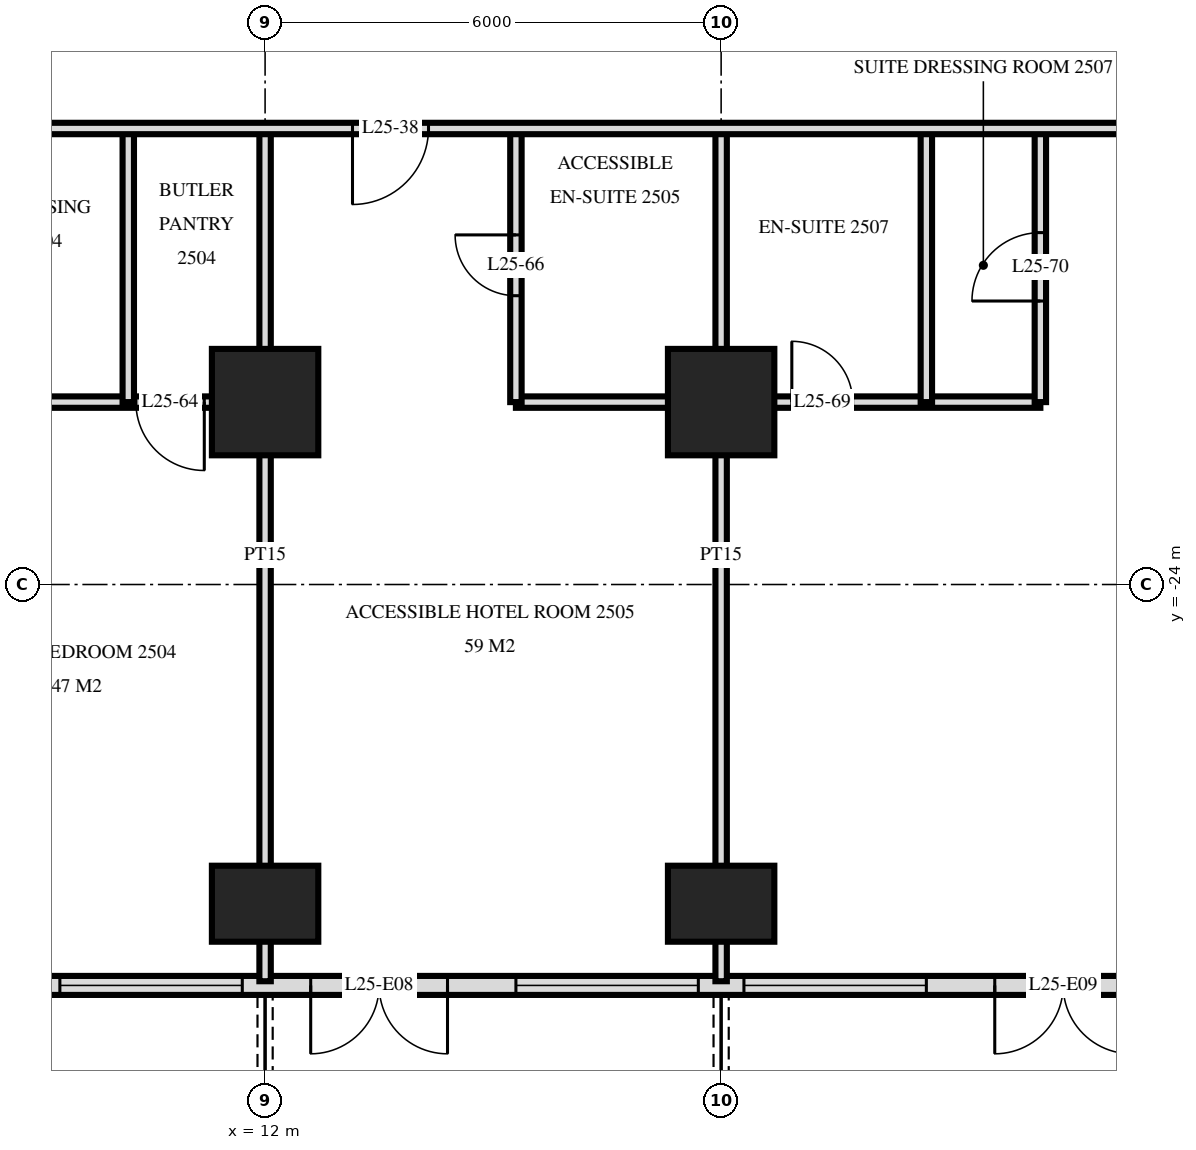
"""IFC4 building model, lengths in metres.
Left out: names, types, materials, properties, quantities, classifications, styles, units other than length and angle.
Written with IfcOpenShell. Run it as: python <this file> out.ifc"""

import sys

from ifc_helpers import new_model, si_unit, direction, frame, frame_2d, origin, origin_2d, place, context, subcontext, project, spatial, rectangle, extrude, element, fill, save


model = new_model("IFC4")
c1 = context("Model", 3, precision=1e-05, world=origin(), true_north=direction((0.0, 1.0)))
c2 = subcontext(c1, "Body", "Model", "MODEL_VIEW")
j1 = project(units=[si_unit("LENGTHUNIT", "METRE"), si_unit("PLANEANGLEUNIT", "RADIAN")], contexts=[c1])
p1 = place(None, origin())
s1 = spatial("IfcSite", under=j1, at=p1, CompositionType="ELEMENT")
p2 = place(p1, origin())
s2 = spatial("IfcBuilding", under=s1, at=p2, CompositionType="ELEMENT")
p3 = place(p2, frame((0.0, 0.0, 99.6)))
s3 = spatial("IfcBuildingStorey", under=s2, at=p3, CompositionType="ELEMENT", Elevation=99.6)
p4 = place(p3, frame((12.0, -28.2, 0.0), z_axis=(0.0, 0.0, 1.0), x_axis=(1.0, 0.0, 0.0)))
e1 = element("IfcColumn", 1, at=p4, inside=s3, PredefinedType="COLUMN", context=c2, shape_type="SweptSolid", body=[
    extrude(rectangle(XDim=1.4, YDim=1.0, at=origin_2d()), origin(), (0.0, 0.0, 1.0), 3.6),
])
p5 = place(p3, frame((12.0, -21.6, 0.0), z_axis=(0.0, 0.0, 1.0), x_axis=(1.0, 0.0, 0.0)))
e2 = element("IfcColumn", 2, at=p5, inside=s3, PredefinedType="COLUMN", context=c2, shape_type="SweptSolid", body=[
    extrude(rectangle(XDim=1.4, YDim=1.4, at=origin_2d()), origin(), (0.0, 0.0, 1.0), 3.6),
])
p6 = place(p3, frame((18.0, -28.2, 0.0), z_axis=(0.0, 0.0, 1.0), x_axis=(1.0, 0.0, 0.0)))
e3 = element("IfcColumn", 3, at=p6, inside=s3, PredefinedType="COLUMN", context=c2, shape_type="SweptSolid", body=[
    extrude(rectangle(XDim=1.4, YDim=1.0, at=origin_2d()), origin(), (0.0, 0.0, 1.0), 3.6),
])
p7 = place(p3, frame((18.0, -21.6, 0.0), z_axis=(0.0, 0.0, 1.0), x_axis=(1.0, 0.0, 0.0)))
e4 = element("IfcColumn", 4, at=p7, inside=s3, PredefinedType="COLUMN", context=c2, shape_type="SweptSolid", body=[
    extrude(rectangle(XDim=1.4, YDim=1.4, at=origin_2d()), origin(), (0.0, 0.0, 1.0), 3.6),
])
p8 = place(p3, frame((-28.775, -29.275, 0.0), z_axis=(0.0, 0.0, 1.0), x_axis=(1.0, 0.0, 0.0)))
e5 = element("IfcWall", 5, at=p8, inside=s3, PredefinedType="SOLIDWALL", context=c2, shape_type="SweptSolid", body=[
    extrude(rectangle(XDim=57.551, YDim=0.25, at=frame_2d((28.775, 0.0))), origin(), (0.0, 0.0, 1.0), 3.32),
])
p9 = place(p8, frame((0.575, 0.0, 0.0)))
e6 = element("IfcOpeningElement", 6, at=p9, cuts=e5, PredefinedType="OPENING", context=c2, shape_type="SweptSolid", body=[
    extrude(rectangle(XDim=1.8, YDim=2.4, at=frame_2d((0.9, 1.2))), frame((0.0, 0.135, 0.0), z_axis=(0.0, -1.0, 0.0), x_axis=(1.0, 0.0, 0.0)), (0.0, 0.0, 1.0), 0.27),
])
p10 = place(p8, frame((5.375, 0.0, 0.0)))
e7 = element("IfcOpeningElement", 7, at=p10, cuts=e5, PredefinedType="OPENING", context=c2, shape_type="SweptSolid", body=[
    extrude(rectangle(XDim=1.8, YDim=2.4, at=frame_2d((0.9, 1.2))), frame((0.0, 0.135, 0.0), z_axis=(0.0, -1.0, 0.0), x_axis=(1.0, 0.0, 0.0)), (0.0, 0.0, 1.0), 0.27),
])
p11 = place(p8, frame((8.075, 0.0, 0.3)))
e8 = element("IfcOpeningElement", 8, at=p11, cuts=e5, PredefinedType="OPENING", context=c2, shape_type="SweptSolid", body=[
    extrude(rectangle(XDim=2.4, YDim=2.1, at=frame_2d((1.2, 1.05))), frame((0.0, 0.135, 0.0), z_axis=(0.0, -1.0, 0.0), x_axis=(1.0, 0.0, 0.0)), (0.0, 0.0, 1.0), 0.27),
])
p12 = place(p8, frame((11.375, 0.0, 0.0)))
e9 = element("IfcOpeningElement", 9, at=p12, cuts=e5, PredefinedType="OPENING", context=c2, shape_type="SweptSolid", body=[
    extrude(rectangle(XDim=1.8, YDim=2.4, at=frame_2d((0.9, 1.2))), frame((0.0, 0.135, 0.0), z_axis=(0.0, -1.0, 0.0), x_axis=(1.0, 0.0, 0.0)), (0.0, 0.0, 1.0), 0.27),
])
p13 = place(p8, frame((14.075, 0.0, 0.3)))
e10 = element("IfcOpeningElement", 10, at=p13, cuts=e5, PredefinedType="OPENING", context=c2, shape_type="SweptSolid", body=[
    extrude(rectangle(XDim=2.4, YDim=2.1, at=frame_2d((1.2, 1.05))), frame((0.0, 0.135, 0.0), z_axis=(0.0, -1.0, 0.0), x_axis=(1.0, 0.0, 0.0)), (0.0, 0.0, 1.0), 0.27),
])
p14 = place(p8, frame((17.375, 0.0, 0.0)))
e11 = element("IfcOpeningElement", 11, at=p14, cuts=e5, PredefinedType="OPENING", context=c2, shape_type="SweptSolid", body=[
    extrude(rectangle(XDim=1.8, YDim=2.4, at=frame_2d((0.9, 1.2))), frame((0.0, 0.135, 0.0), z_axis=(0.0, -1.0, 0.0), x_axis=(1.0, 0.0, 0.0)), (0.0, 0.0, 1.0), 0.27),
])
p15 = place(p8, frame((20.075, 0.0, 0.3)))
e12 = element("IfcOpeningElement", 12, at=p15, cuts=e5, PredefinedType="OPENING", context=c2, shape_type="SweptSolid", body=[
    extrude(rectangle(XDim=2.4, YDim=2.1, at=frame_2d((1.2, 1.05))), frame((0.0, 0.135, 0.0), z_axis=(0.0, -1.0, 0.0), x_axis=(1.0, 0.0, 0.0)), (0.0, 0.0, 1.0), 0.27),
])
p16 = place(p8, frame((23.075, 0.0, 0.3)))
e13 = element("IfcOpeningElement", 13, at=p16, cuts=e5, PredefinedType="OPENING", context=c2, shape_type="SweptSolid", body=[
    extrude(rectangle(XDim=2.4, YDim=2.1, at=frame_2d((1.2, 1.05))), frame((0.0, 0.135, 0.0), z_axis=(0.0, -1.0, 0.0), x_axis=(1.0, 0.0, 0.0)), (0.0, 0.0, 1.0), 0.27),
])
p17 = place(p8, frame((26.375, 0.0, 0.0)))
e14 = element("IfcOpeningElement", 14, at=p17, cuts=e5, PredefinedType="OPENING", context=c2, shape_type="SweptSolid", body=[
    extrude(rectangle(XDim=1.8, YDim=2.4, at=frame_2d((0.9, 1.2))), frame((0.0, 0.135, 0.0), z_axis=(0.0, -1.0, 0.0), x_axis=(1.0, 0.0, 0.0)), (0.0, 0.0, 1.0), 0.27),
])
p18 = place(p8, frame((29.075, 0.0, 0.3)))
e15 = element("IfcOpeningElement", 15, at=p18, cuts=e5, PredefinedType="OPENING", context=c2, shape_type="SweptSolid", body=[
    extrude(rectangle(XDim=2.4, YDim=2.1, at=frame_2d((1.2, 1.05))), frame((0.0, 0.135, 0.0), z_axis=(0.0, -1.0, 0.0), x_axis=(1.0, 0.0, 0.0)), (0.0, 0.0, 1.0), 0.27),
])
p19 = place(p8, frame((32.375, 0.0, 0.0)))
e16 = element("IfcOpeningElement", 16, at=p19, cuts=e5, PredefinedType="OPENING", context=c2, shape_type="SweptSolid", body=[
    extrude(rectangle(XDim=1.8, YDim=2.4, at=frame_2d((0.9, 1.2))), frame((0.0, 0.135, 0.0), z_axis=(0.0, -1.0, 0.0), x_axis=(1.0, 0.0, 0.0)), (0.0, 0.0, 1.0), 0.27),
])
p20 = place(p8, frame((35.375, 0.0, 0.0)))
e17 = element("IfcOpeningElement", 17, at=p20, cuts=e5, PredefinedType="OPENING", context=c2, shape_type="SweptSolid", body=[
    extrude(rectangle(XDim=1.8, YDim=2.4, at=frame_2d((0.9, 1.2))), frame((0.0, 0.135, 0.0), z_axis=(0.0, -1.0, 0.0), x_axis=(1.0, 0.0, 0.0)), (0.0, 0.0, 1.0), 0.27),
])
p21 = place(p8, frame((38.075, 0.0, 0.3)))
e18 = element("IfcOpeningElement", 18, at=p21, cuts=e5, PredefinedType="OPENING", context=c2, shape_type="SweptSolid", body=[
    extrude(rectangle(XDim=2.4, YDim=2.1, at=frame_2d((1.2, 1.05))), frame((0.0, 0.135, 0.0), z_axis=(0.0, -1.0, 0.0), x_axis=(1.0, 0.0, 0.0)), (0.0, 0.0, 1.0), 0.27),
])
p22 = place(p8, frame((41.375, 0.0, 0.0)))
e19 = element("IfcOpeningElement", 19, at=p22, cuts=e5, PredefinedType="OPENING", context=c2, shape_type="SweptSolid", body=[
    extrude(rectangle(XDim=1.8, YDim=2.4, at=frame_2d((0.9, 1.2))), frame((0.0, 0.135, 0.0), z_axis=(0.0, -1.0, 0.0), x_axis=(1.0, 0.0, 0.0)), (0.0, 0.0, 1.0), 0.27),
])
p23 = place(p8, frame((44.075, 0.0, 0.3)))
e20 = element("IfcOpeningElement", 20, at=p23, cuts=e5, PredefinedType="OPENING", context=c2, shape_type="SweptSolid", body=[
    extrude(rectangle(XDim=2.4, YDim=2.1, at=frame_2d((1.2, 1.05))), frame((0.0, 0.135, 0.0), z_axis=(0.0, -1.0, 0.0), x_axis=(1.0, 0.0, 0.0)), (0.0, 0.0, 1.0), 0.27),
])
p24 = place(p8, frame((47.075, 0.0, 0.3)))
e21 = element("IfcOpeningElement", 21, at=p24, cuts=e5, PredefinedType="OPENING", context=c2, shape_type="SweptSolid", body=[
    extrude(rectangle(XDim=2.4, YDim=2.1, at=frame_2d((1.2, 1.05))), frame((0.0, 0.135, 0.0), z_axis=(0.0, -1.0, 0.0), x_axis=(1.0, 0.0, 0.0)), (0.0, 0.0, 1.0), 0.27),
])
p25 = place(p8, frame((50.375, 0.0, 0.0)))
e22 = element("IfcOpeningElement", 22, at=p25, cuts=e5, PredefinedType="OPENING", context=c2, shape_type="SweptSolid", body=[
    extrude(rectangle(XDim=1.8, YDim=2.4, at=frame_2d((0.9, 1.2))), frame((0.0, 0.135, 0.0), z_axis=(0.0, -1.0, 0.0), x_axis=(1.0, 0.0, 0.0)), (0.0, 0.0, 1.0), 0.27),
])
p26 = place(p8, frame((53.375, 0.0, 0.0)))
e23 = element("IfcOpeningElement", 23, at=p26, cuts=e5, PredefinedType="OPENING", context=c2, shape_type="SweptSolid", body=[
    extrude(rectangle(XDim=1.8, YDim=2.4, at=frame_2d((0.9, 1.2))), frame((0.0, 0.135, 0.0), z_axis=(0.0, -1.0, 0.0), x_axis=(1.0, 0.0, 0.0)), (0.0, 0.0, 1.0), 0.27),
])
p27 = place(p3, frame((22.2, -21.6, 0.0), z_axis=(0.0, 0.0, 1.0), x_axis=(0.0, 1.0, 0.0)))
e24 = element("IfcWall", 24, at=p27, inside=s3, PredefinedType="PARTITIONING", context=c2, shape_type="SweptSolid", body=[
    extrude(rectangle(XDim=3.6, YDim=0.15, at=frame_2d((1.8, 0.0))), origin(), (0.0, 0.0, 1.0), 3.32),
])
p28 = place(p27, frame((1.33, 0.0, 0.0)))
e25 = element("IfcOpeningElement", 25, at=p28, cuts=e24, PredefinedType="OPENING", context=c2, shape_type="SweptSolid", body=[
    extrude(rectangle(XDim=0.9, YDim=2.1, at=frame_2d((0.45, 1.05))), frame((0.0, 0.085, 0.0), z_axis=(0.0, -1.0, 0.0), x_axis=(1.0, 0.0, 0.0)), (0.0, 0.0, 1.0), 0.17),
])
p29 = place(p3, frame((20.7, -21.6, 0.0), z_axis=(0.0, 0.0, 1.0), x_axis=(0.0, 1.0, 0.0)))
e26 = element("IfcWall", 26, at=p29, inside=s3, PredefinedType="PARTITIONING", context=c2, shape_type="SweptSolid", body=[
    extrude(rectangle(XDim=3.6, YDim=0.15, at=frame_2d((1.8, 0.0))), origin(), (0.0, 0.0, 1.0), 3.32),
])
p30 = place(p3, frame((18.0, -29.22, 0.0), z_axis=(0.0, 0.0, 1.0), x_axis=(0.0, 1.0, 0.0)))
e27 = element("IfcWall", 27, at=p30, inside=s3, PredefinedType="PARTITIONING", context=c2, shape_type="SweptSolid", body=[
    extrude(rectangle(XDim=11.22, YDim=0.15, at=frame_2d((5.61, 0.0))), origin(), (0.0, 0.0, 1.0), 3.32),
])
p31 = place(p3, frame((15.3, -21.6, 0.0), z_axis=(0.0, 0.0, 1.0), x_axis=(0.0, 1.0, 0.0)))
e28 = element("IfcWall", 28, at=p31, inside=s3, PredefinedType="PARTITIONING", context=c2, shape_type="SweptSolid", body=[
    extrude(rectangle(XDim=3.6, YDim=0.15, at=frame_2d((1.8, 0.0))), origin(), (0.0, 0.0, 1.0), 3.32),
])
p32 = place(p31, frame((1.4, 0.0, 0.0)))
e29 = element("IfcOpeningElement", 29, at=p32, cuts=e28, PredefinedType="OPENING", context=c2, shape_type="SweptSolid", body=[
    extrude(rectangle(XDim=0.8, YDim=2.1, at=frame_2d((0.4, 1.05))), frame((0.0, 0.085, 0.0), z_axis=(0.0, -1.0, 0.0), x_axis=(1.0, 0.0, 0.0)), (0.0, 0.0, 1.0), 0.17),
])
p33 = place(p3, frame((12.0, -29.22, 0.0), z_axis=(0.0, 0.0, 1.0), x_axis=(0.0, 1.0, 0.0)))
e30 = element("IfcWall", 30, at=p33, inside=s3, PredefinedType="PARTITIONING", context=c2, shape_type="SweptSolid", body=[
    extrude(rectangle(XDim=11.22, YDim=0.15, at=frame_2d((5.61, 0.0))), origin(), (0.0, 0.0, 1.0), 3.32),
])
p34 = place(p3, frame((10.2, -21.6, 0.0), z_axis=(0.0, 0.0, 1.0), x_axis=(0.0, 1.0, 0.0)))
e31 = element("IfcWall", 31, at=p34, inside=s3, PredefinedType="PARTITIONING", context=c2, shape_type="SweptSolid", body=[
    extrude(rectangle(XDim=3.6, YDim=0.15, at=frame_2d((1.8, 0.0))), origin(), (0.0, 0.0, 1.0), 3.32),
])
p35 = place(p3, frame((4.2, -21.6, 0.0), z_axis=(0.0, 0.0, 1.0), x_axis=(1.0, 0.0, 0.0)))
e32 = element("IfcWall", 32, at=p35, inside=s3, PredefinedType="PARTITIONING", context=c2, shape_type="SweptSolid", body=[
    extrude(rectangle(XDim=7.8, YDim=0.15, at=frame_2d((3.9, 0.0))), origin(), (0.0, 0.0, 1.0), 3.32),
])
p36 = place(p35, frame((0.2, 0.0, 0.0)))
e33 = element("IfcOpeningElement", 33, at=p36, cuts=e32, PredefinedType="OPENING", context=c2, shape_type="SweptSolid", body=[
    extrude(rectangle(XDim=0.8, YDim=2.1, at=frame_2d((0.4, 1.05))), frame((0.0, 0.085, 0.0), z_axis=(0.0, -1.0, 0.0), x_axis=(1.0, 0.0, 0.0)), (0.0, 0.0, 1.0), 0.17),
])
p37 = place(p35, frame((4.03, 0.0, 0.0)))
e34 = element("IfcOpeningElement", 34, at=p37, cuts=e32, PredefinedType="OPENING", context=c2, shape_type="SweptSolid", body=[
    extrude(rectangle(XDim=0.9, YDim=2.1, at=frame_2d((0.45, 1.05))), frame((0.0, 0.085, 0.0), z_axis=(0.0, -1.0, 0.0), x_axis=(1.0, 0.0, 0.0)), (0.0, 0.0, 1.0), 0.17),
])
p38 = place(p35, frame((6.1, 0.0, 0.0)))
e35 = element("IfcOpeningElement", 35, at=p38, cuts=e32, PredefinedType="OPENING", context=c2, shape_type="SweptSolid", body=[
    extrude(rectangle(XDim=0.9, YDim=2.1, at=frame_2d((0.45, 1.05))), frame((0.0, 0.085, 0.0), z_axis=(0.0, -1.0, 0.0), x_axis=(1.0, 0.0, 0.0)), (0.0, 0.0, 1.0), 0.17),
])
p39 = place(p3, frame((15.3, -21.6, 0.0), z_axis=(0.0, 0.0, 1.0), x_axis=(1.0, 0.0, 0.0)))
e36 = element("IfcWall", 36, at=p39, inside=s3, PredefinedType="PARTITIONING", context=c2, shape_type="SweptSolid", body=[
    extrude(rectangle(XDim=6.9, YDim=0.15, at=frame_2d((3.45, 0.0))), origin(), (0.0, 0.0, 1.0), 3.32),
])
p40 = place(p39, frame((3.63, 0.0, 0.0)))
e37 = element("IfcOpeningElement", 37, at=p40, cuts=e36, PredefinedType="OPENING", context=c2, shape_type="SweptSolid", body=[
    extrude(rectangle(XDim=0.8, YDim=2.1, at=frame_2d((0.4, 1.05))), frame((0.0, 0.085, 0.0), z_axis=(0.0, -1.0, 0.0), x_axis=(1.0, 0.0, 0.0)), (0.0, 0.0, 1.0), 0.17),
])
p41 = place(p3, frame((-33.12, -18.0, 0.0), z_axis=(0.0, 0.0, 1.0), x_axis=(1.0, 0.0, 0.0)))
e38 = element("IfcWall", 38, at=p41, inside=s3, PredefinedType="PARTITIONING", context=c2, shape_type="SweptSolid", body=[
    extrude(rectangle(XDim=66.24, YDim=0.15, at=frame_2d((33.12, 0.0))), origin(), (0.0, 0.0, 1.0), 3.32),
])
p42 = place(p41, frame((14.02, 0.0, 0.0)))
e39 = element("IfcOpeningElement", 39, at=p42, cuts=e38, PredefinedType="OPENING", context=c2, shape_type="SweptSolid", body=[
    extrude(rectangle(XDim=1.0, YDim=2.1, at=frame_2d((0.5, 1.05))), frame((0.0, 0.085, 0.0), z_axis=(0.0, -1.0, 0.0), x_axis=(1.0, 0.0, 0.0)), (0.0, 0.0, 1.0), 0.17),
])
p43 = place(p41, frame((18.82, 0.0, 0.0)))
e40 = element("IfcOpeningElement", 40, at=p43, cuts=e38, PredefinedType="OPENING", context=c2, shape_type="SweptSolid", body=[
    extrude(rectangle(XDim=1.0, YDim=2.1, at=frame_2d((0.5, 1.05))), frame((0.0, 0.085, 0.0), z_axis=(0.0, -1.0, 0.0), x_axis=(1.0, 0.0, 0.0)), (0.0, 0.0, 1.0), 0.17),
])
p44 = place(p41, frame((30.27, 0.0, 0.0)))
e41 = element("IfcOpeningElement", 41, at=p44, cuts=e38, PredefinedType="OPENING", context=c2, shape_type="SweptSolid", body=[
    extrude(rectangle(XDim=1.0, YDim=2.1, at=frame_2d((0.5, 1.05))), frame((0.0, 0.085, 0.0), z_axis=(0.0, -1.0, 0.0), x_axis=(1.0, 0.0, 0.0)), (0.0, 0.0, 1.0), 0.17),
])
p45 = place(p41, frame((33.82, 0.0, 0.0)))
e42 = element("IfcOpeningElement", 42, at=p45, cuts=e38, PredefinedType="OPENING", context=c2, shape_type="SweptSolid", body=[
    extrude(rectangle(XDim=1.0, YDim=2.1, at=frame_2d((0.5, 1.05))), frame((0.0, 0.085, 0.0), z_axis=(0.0, -1.0, 0.0), x_axis=(1.0, 0.0, 0.0)), (0.0, 0.0, 1.0), 0.17),
])
p46 = place(p41, frame((46.27, 0.0, 0.0)))
e43 = element("IfcOpeningElement", 43, at=p46, cuts=e38, PredefinedType="OPENING", context=c2, shape_type="SweptSolid", body=[
    extrude(rectangle(XDim=1.0, YDim=2.1, at=frame_2d((0.5, 1.05))), frame((0.0, 0.085, 0.0), z_axis=(0.0, -1.0, 0.0), x_axis=(1.0, 0.0, 0.0)), (0.0, 0.0, 1.0), 0.17),
])
p47 = place(p41, frame((6.07, 0.0, 0.0)))
e44 = element("IfcOpeningElement", 44, at=p47, cuts=e38, PredefinedType="OPENING", context=c2, shape_type="SweptSolid", body=[
    extrude(rectangle(XDim=1.0, YDim=2.1, at=frame_2d((0.5, 1.05))), frame((0.0, 0.085, 0.0), z_axis=(0.0, -1.0, 0.0), x_axis=(1.0, 0.0, 0.0)), (0.0, 0.0, 1.0), 0.17),
])
p48 = place(p41, frame((60.37, 0.0, 0.0)))
e45 = element("IfcOpeningElement", 45, at=p48, cuts=e38, PredefinedType="OPENING", context=c2, shape_type="SweptSolid", body=[
    extrude(rectangle(XDim=1.0, YDim=2.1, at=frame_2d((0.5, 1.05))), frame((0.0, 0.085, 0.0), z_axis=(0.0, -1.0, 0.0), x_axis=(1.0, 0.0, 0.0)), (0.0, 0.0, 1.0), 0.17),
])
p49 = place(p21, origin())
e46 = element("IfcWindow", 46, at=p49, inside=s3, PartitioningType="SINGLE_PANEL", PredefinedType="WINDOW", context=c2, shape_type="SweptSolid", body=[
    extrude(rectangle(XDim=2.4, YDim=2.1, at=frame_2d((1.2, 1.05))), frame((0.0, 0.03, 0.0), z_axis=(0.0, -1.0, 0.0), x_axis=(1.0, 0.0, 0.0)), (0.0, 0.0, 1.0), 0.06),
])
fill(e18, e46)
p50 = place(p22, frame((0.9, 0.0, 0.0), z_axis=(0.0, 0.0, 1.0), x_axis=(-1.0, 0.0, 0.0)))
e47 = element("IfcDoor", 47, at=p50, inside=s3, OperationType="DOUBLE_DOOR_SINGLE_SWING", PredefinedType="DOOR", context=c2, shape_type="SweptSolid", body=[
    extrude(rectangle(XDim=1.8, YDim=2.4, at=frame_2d((0.0, 1.2))), frame((0.0, -0.025, 0.0), z_axis=(0.0, 1.0, 0.0), x_axis=(-1.0, 0.0, 0.0)), (0.0, 0.0, 1.0), 0.05),
])
fill(e19, e47)
p51 = place(p23, origin())
e48 = element("IfcWindow", 48, at=p51, inside=s3, PartitioningType="SINGLE_PANEL", PredefinedType="WINDOW", context=c2, shape_type="SweptSolid", body=[
    extrude(rectangle(XDim=2.4, YDim=2.1, at=frame_2d((1.2, 1.05))), frame((0.0, 0.03, 0.0), z_axis=(0.0, -1.0, 0.0), x_axis=(1.0, 0.0, 0.0)), (0.0, 0.0, 1.0), 0.06),
])
fill(e20, e48)
p52 = place(p24, origin())
e49 = element("IfcWindow", 49, at=p52, inside=s3, PartitioningType="SINGLE_PANEL", PredefinedType="WINDOW", context=c2, shape_type="SweptSolid", body=[
    extrude(rectangle(XDim=2.4, YDim=2.1, at=frame_2d((1.2, 1.05))), frame((0.0, 0.03, 0.0), z_axis=(0.0, -1.0, 0.0), x_axis=(1.0, 0.0, 0.0)), (0.0, 0.0, 1.0), 0.06),
])
fill(e21, e49)
p53 = place(p25, frame((0.9, 0.0, 0.0), z_axis=(0.0, 0.0, 1.0), x_axis=(-1.0, 0.0, 0.0)))
e50 = element("IfcDoor", 50, at=p53, inside=s3, OperationType="DOUBLE_DOOR_SINGLE_SWING", PredefinedType="DOOR", context=c2, shape_type="SweptSolid", body=[
    extrude(rectangle(XDim=1.8, YDim=2.4, at=frame_2d((0.0, 1.2))), frame((0.0, -0.025, 0.0), z_axis=(0.0, 1.0, 0.0), x_axis=(-1.0, 0.0, 0.0)), (0.0, 0.0, 1.0), 0.05),
])
fill(e22, e50)
p54 = place(p46, frame((0.5, 0.0, 0.0), z_axis=(0.0, 0.0, 1.0), x_axis=(-1.0, 0.0, 0.0)))
e51 = element("IfcDoor", 51, at=p54, inside=s3, OperationType="SINGLE_SWING_LEFT", PredefinedType="DOOR", context=c2, shape_type="SweptSolid", body=[
    extrude(rectangle(XDim=1.0, YDim=2.1, at=frame_2d((0.0, 1.05))), frame((0.0, -0.025, 0.0), z_axis=(0.0, 1.0, 0.0), x_axis=(-1.0, 0.0, 0.0)), (0.0, 0.0, 1.0), 0.05),
])
fill(e43, e51)
p55 = place(p38, frame((0.45, 0.0, 0.0), z_axis=(0.0, 0.0, 1.0), x_axis=(-1.0, 0.0, 0.0)))
e52 = element("IfcDoor", 52, at=p55, inside=s3, OperationType="SINGLE_SWING_RIGHT", PredefinedType="DOOR", context=c2, shape_type="SweptSolid", body=[
    extrude(rectangle(XDim=0.9, YDim=2.1, at=frame_2d((0.0, 1.05))), frame((0.0, -0.025, 0.0), z_axis=(0.0, 1.0, 0.0), x_axis=(-1.0, 0.0, 0.0)), (0.0, 0.0, 1.0), 0.05),
])
fill(e35, e52)
p56 = place(p32, origin())
e53 = element("IfcDoor", 53, at=p56, inside=s3, OperationType="SINGLE_SWING_LEFT", PredefinedType="DOOR", context=c2, shape_type="SweptSolid", body=[
    extrude(rectangle(XDim=0.8, YDim=2.1, at=frame_2d((0.4, 1.05))), frame((0.0, 0.025, 0.0), z_axis=(0.0, -1.0, 0.0), x_axis=(1.0, 0.0, 0.0)), (0.0, 0.0, 1.0), 0.05),
])
fill(e29, e53)
p57 = place(p40, origin())
e54 = element("IfcDoor", 54, at=p57, inside=s3, OperationType="SINGLE_SWING_RIGHT", PredefinedType="DOOR", context=c2, shape_type="SweptSolid", body=[
    extrude(rectangle(XDim=0.8, YDim=2.1, at=frame_2d((0.4, 1.05))), frame((0.0, 0.025, 0.0), z_axis=(0.0, -1.0, 0.0), x_axis=(1.0, 0.0, 0.0)), (0.0, 0.0, 1.0), 0.05),
])
fill(e37, e54)
p58 = place(p28, origin())
e55 = element("IfcDoor", 55, at=p58, inside=s3, OperationType="SINGLE_SWING_RIGHT", PredefinedType="DOOR", context=c2, shape_type="SweptSolid", body=[
    extrude(rectangle(XDim=0.9, YDim=2.1, at=frame_2d((0.45, 1.05))), frame((0.0, 0.025, 0.0), z_axis=(0.0, -1.0, 0.0), x_axis=(1.0, 0.0, 0.0)), (0.0, 0.0, 1.0), 0.05),
])
fill(e25, e55)
save(model, sys.argv[1])
